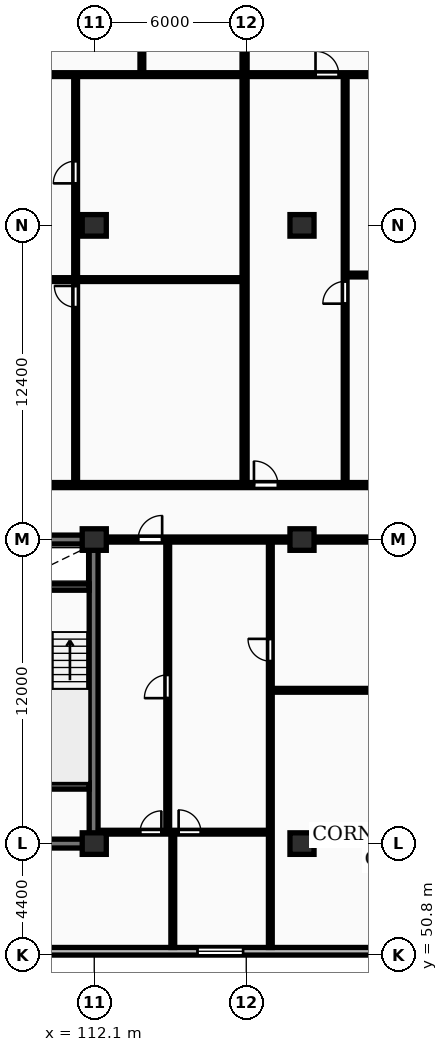
"""IFC4 building model, lengths in metres.
Left out: names, types, materials, properties, quantities, classifications, styles, units other than length and angle.
Written with IfcOpenShell. Run it as: python <this file> out.ifc"""

import sys

from ifc_helpers import new_model, si_unit, direction, frame, frame_2d, origin, origin_2d, place, context, subcontext, project, spatial, rectangle, extrude, element, fill, save


model = new_model("IFC4")
c1 = context("Model", 3, precision=1e-05, world=origin(), true_north=direction((0.0, 1.0)))
c2 = subcontext(c1, "Body", "Model", "MODEL_VIEW")
j1 = project(units=[si_unit("LENGTHUNIT", "METRE"), si_unit("PLANEANGLEUNIT", "RADIAN")], contexts=[c1])
p1 = place(None, origin())
s1 = spatial("IfcSite", under=j1, at=p1, CompositionType="ELEMENT")
p2 = place(p1, origin())
s2 = spatial("IfcBuilding", under=s1, at=p2, CompositionType="ELEMENT")
p3 = place(p2, frame((0.0, 0.0, 87.3)))
s3 = spatial("IfcBuildingStorey", under=s2, at=p3, CompositionType="ELEMENT", Elevation=87.3)
for number, where, z_axis, x_axis in (
    (1, (112.1, 55.2, 0.0), (0.0, 0.0, 1.0), (1.0, 0.0, 0.0)),
    (2, (112.1, 67.2, 0.0), (0.0, 0.0, 1.0), (1.0, 0.0, 0.0)),
    (3, (112.1, 79.6, 0.0), (0.0, 0.0, 1.0), (1.0, 0.0, 0.0)),
    (4, (120.3, 55.2, 0.0), (0.0, 0.0, 1.0), (1.0, 0.0, 0.0)),
    (5, (120.3, 67.2, 0.0), (0.0, 0.0, 1.0), (1.0, 0.0, 0.0)),
    (6, (120.3, 79.6, 0.0), (0.0, 0.0, 1.0), (1.0, 0.0, 0.0)),
):
    element("IfcColumn", number, at=place(p3, frame(where, z_axis=z_axis, x_axis=x_axis)), inside=s3, PredefinedType="COLUMN", context=c2, shape_type="SweptSolid", body=[
        extrude(rectangle(XDim=0.95, YDim=0.85, at=origin_2d()), origin(), (0.0, 0.0, 1.0), 3.25),
    ])
p4 = place(p3, frame((57.6, 50.95, 0.0), z_axis=(0.0, 0.0, 1.0), x_axis=(1.0, 0.0, 0.0)))
e7 = element("IfcWall", 7, at=p4, inside=s3, PredefinedType="STANDARD", context=c2, shape_type="SweptSolid", body=[
    extrude(rectangle(XDim=73.0, YDim=0.3, at=frame_2d((36.5, 0.0))), origin(), (0.0, 0.0, 1.0), 2.97),
])
p5 = place(p4, frame((15.225, 0.0, 0.85)))
e8 = element("IfcOpeningElement", 8, at=p5, cuts=e7, PredefinedType="OPENING", context=c2, shape_type="SweptSolid", body=[
    extrude(rectangle(XDim=1.8, YDim=1.8, at=frame_2d((0.9, 0.9))), frame((0.0, 0.16, 0.0), z_axis=(0.0, -1.0, 0.0), x_axis=(1.0, 0.0, 0.0)), (0.0, 0.0, 1.0), 0.32),
])
p6 = place(p4, frame((58.575, 0.0, 0.85)))
e9 = element("IfcOpeningElement", 9, at=p6, cuts=e7, PredefinedType="OPENING", context=c2, shape_type="SweptSolid", body=[
    extrude(rectangle(XDim=1.8, YDim=1.8, at=frame_2d((0.9, 0.9))), frame((0.0, 0.16, 0.0), z_axis=(0.0, -1.0, 0.0), x_axis=(1.0, 0.0, 0.0)), (0.0, 0.0, 1.0), 0.32),
])
p7 = place(p3, frame((75.95, 55.2, 0.0), z_axis=(0.0, 0.0, 1.0), x_axis=(1.0, 0.0, 0.0)))
e10 = element("IfcWall", 10, at=p7, inside=s3, PredefinedType="SHEAR", context=c2, shape_type="SweptSolid", body=[
    extrude(rectangle(XDim=36.3, YDim=0.35, at=frame_2d((18.15, 0.0))), origin(), (0.0, 0.0, 1.0), 3.25),
])
p8 = place(p3, frame((112.075, 55.375, 0.0), z_axis=(0.0, 0.0, 1.0), x_axis=(0.0, 1.0, 0.0)))
e11 = element("IfcWall", 11, at=p8, inside=s3, PredefinedType="SHEAR", context=c2, shape_type="SweptSolid", body=[
    extrude(rectangle(XDim=11.65, YDim=0.35, at=frame_2d((5.825, 0.0))), origin(), (0.0, 0.0, 1.0), 3.25),
])
p9 = place(p3, frame((75.95, 67.2, 0.0), z_axis=(0.0, 0.0, 1.0), x_axis=(1.0, 0.0, 0.0)))
e12 = element("IfcWall", 12, at=p9, inside=s3, PredefinedType="SHEAR", context=c2, shape_type="SweptSolid", body=[
    extrude(rectangle(XDim=36.3, YDim=0.35, at=frame_2d((18.15, 0.0))), origin(), (0.0, 0.0, 1.0), 3.25),
])
p10 = place(p9, frame((5.25, 0.0, 0.0)))
e13 = element("IfcOpeningElement", 13, at=p10, cuts=e12, PredefinedType="OPENING", context=c2, shape_type="SweptSolid", body=[
    extrude(rectangle(XDim=1.0, YDim=2.15, at=frame_2d((0.5, 1.075))), frame((0.0, 0.185, 0.0), z_axis=(0.0, -1.0, 0.0), x_axis=(1.0, 0.0, 0.0)), (0.0, 0.0, 1.0), 0.37),
])
p11 = place(p9, frame((21.6, 0.0, 0.0)))
e14 = element("IfcOpeningElement", 14, at=p11, cuts=e12, PredefinedType="OPENING", context=c2, shape_type="SweptSolid", body=[
    extrude(rectangle(XDim=1.5, YDim=2.2, at=frame_2d((0.75, 1.1))), frame((0.0, 0.185, 0.0), z_axis=(0.0, -1.0, 0.0), x_axis=(1.0, 0.0, 0.0)), (0.0, 0.0, 1.0), 0.37),
])
p12 = place(p9, frame((30.45, 0.0, 0.0)))
e15 = element("IfcOpeningElement", 15, at=p12, cuts=e12, PredefinedType="OPENING", context=c2, shape_type="SweptSolid", body=[
    extrude(rectangle(XDim=1.0, YDim=2.15, at=frame_2d((0.5, 1.075))), frame((0.0, 0.185, 0.0), z_axis=(0.0, -1.0, 0.0), x_axis=(1.0, 0.0, 0.0)), (0.0, 0.0, 1.0), 0.37),
])
for number, where, z_axis, x_axis in (
    (16, (108.66, 57.475, 0.0), (0.0, 0.0, 1.0), (1.0, 0.0, 0.0)),
    (17, (108.66, 65.325, 0.0), (0.0, 0.0, 1.0), (1.0, 0.0, 0.0)),
):
    element("IfcWall", number, at=place(p3, frame(where, z_axis=z_axis, x_axis=x_axis)), inside=s3, PredefinedType="SHEAR", context=c2, shape_type="SweptSolid", body=[
        extrude(rectangle(XDim=3.24, YDim=0.25, at=frame_2d((1.62, 0.0))), origin(), (0.0, 0.0, 1.0), 3.25),
    ])
p13 = place(p3, frame((119.05, 61.25, 0.0), z_axis=(0.0, 0.0, 1.0), x_axis=(1.0, 0.0, 0.0)))
e18 = element("IfcWall", 18, at=p13, inside=s3, PredefinedType="PARTITIONING", context=c2, shape_type="SweptSolid", body=[
    extrude(rectangle(XDim=11.55, YDim=0.15, at=frame_2d((5.775, 0.0))), origin(), (0.0, 0.0, 1.0), 2.97),
])
p14 = place(p13, frame((5.355, 0.0, 0.0)))
e19 = element("IfcOpeningElement", 19, at=p14, cuts=e18, PredefinedType="OPENING", context=c2, shape_type="SweptSolid", body=[
    extrude(rectangle(XDim=0.84, YDim=2.04, at=frame_2d((0.42, 1.02))), frame((0.0, 0.085, 0.0), z_axis=(0.0, -1.0, 0.0), x_axis=(1.0, 0.0, 0.0)), (0.0, 0.0, 1.0), 0.17),
])
p15 = place(p3, frame((119.05, 51.1, 0.0), z_axis=(0.0, 0.0, 1.0), x_axis=(0.0, 1.0, 0.0)))
e20 = element("IfcWall", 20, at=p15, inside=s3, PredefinedType="PARTITIONING", context=c2, shape_type="SweptSolid", body=[
    extrude(rectangle(XDim=16.05, YDim=0.15, at=frame_2d((8.025, 0.0))), origin(), (0.0, 0.0, 1.0), 2.97),
])
p16 = place(p15, frame((11.3, 0.0, 0.0)))
e21 = element("IfcOpeningElement", 21, at=p16, cuts=e20, PredefinedType="OPENING", context=c2, shape_type="SweptSolid", body=[
    extrude(rectangle(XDim=0.88, YDim=2.06, at=frame_2d((0.44, 1.03))), frame((0.0, 0.085, 0.0), z_axis=(0.0, -1.0, 0.0), x_axis=(1.0, 0.0, 0.0)), (0.0, 0.0, 1.0), 0.17),
])
p17 = place(p3, frame((115.0, 55.65, 0.0), z_axis=(0.0, 0.0, 1.0), x_axis=(0.0, 1.0, 0.0)))
e22 = element("IfcWall", 22, at=p17, inside=s3, PredefinedType="PARTITIONING", context=c2, shape_type="SweptSolid", body=[
    extrude(rectangle(XDim=11.5, YDim=0.15, at=frame_2d((5.75, 0.0))), origin(), (0.0, 0.0, 1.0), 2.97),
])
p18 = place(p17, frame((5.29, 0.0, 0.0)))
e23 = element("IfcOpeningElement", 23, at=p18, cuts=e22, PredefinedType="OPENING", context=c2, shape_type="SweptSolid", body=[
    extrude(rectangle(XDim=0.92, YDim=2.08, at=frame_2d((0.46, 1.04))), frame((0.0, 0.085, 0.0), z_axis=(0.0, -1.0, 0.0), x_axis=(1.0, 0.0, 0.0)), (0.0, 0.0, 1.0), 0.17),
])
p19 = place(p3, frame((115.2, 51.1, 0.0), z_axis=(0.0, 0.0, 1.0), x_axis=(0.0, 1.0, 0.0)))
e24 = element("IfcWall", 24, at=p19, inside=s3, PredefinedType="PARTITIONING", context=c2, shape_type="SweptSolid", body=[
    extrude(rectangle(XDim=4.55, YDim=0.15, at=frame_2d((2.275, 0.0))), origin(), (0.0, 0.0, 1.0), 2.97),
])
p20 = place(p3, frame((112.27, 55.65, 0.0), z_axis=(0.0, 0.0, 1.0), x_axis=(1.0, 0.0, 0.0)))
e25 = element("IfcWall", 25, at=p20, inside=s3, PredefinedType="PARTITIONING", context=c2, shape_type="SweptSolid", body=[
    extrude(rectangle(XDim=6.76, YDim=0.15, at=frame_2d((3.38, 0.0))), origin(), (0.0, 0.0, 1.0), 2.97),
])
p21 = place(p20, frame((1.64, 0.0, 0.0)))
e26 = element("IfcOpeningElement", 26, at=p21, cuts=e25, PredefinedType="OPENING", context=c2, shape_type="SweptSolid", body=[
    extrude(rectangle(XDim=0.84, YDim=2.04, at=frame_2d((0.42, 1.02))), frame((0.0, 0.085, 0.0), z_axis=(0.0, -1.0, 0.0), x_axis=(1.0, 0.0, 0.0)), (0.0, 0.0, 1.0), 0.17),
])
p22 = place(p20, frame((3.16, 0.0, 0.0)))
e27 = element("IfcOpeningElement", 27, at=p22, cuts=e25, PredefinedType="OPENING", context=c2, shape_type="SweptSolid", body=[
    extrude(rectangle(XDim=0.88, YDim=2.06, at=frame_2d((0.44, 1.03))), frame((0.0, 0.085, 0.0), z_axis=(0.0, -1.0, 0.0), x_axis=(1.0, 0.0, 0.0)), (0.0, 0.0, 1.0), 0.17),
])
p23 = place(p3, frame((112.25, 67.2, 0.0), z_axis=(0.0, 0.0, 1.0), x_axis=(1.0, 0.0, 0.0)))
e28 = element("IfcWall", 28, at=p23, inside=s3, PredefinedType="PARTITIONING", context=c2, shape_type="SweptSolid", body=[
    extrude(rectangle(XDim=18.35, YDim=0.2, at=frame_2d((9.175, 0.0))), origin(), (0.0, 0.0, 1.0), 2.433),
])
p24 = place(p23, frame((1.58, 0.0, 0.0)))
e29 = element("IfcOpeningElement", 29, at=p24, cuts=e28, PredefinedType="OPENING", context=c2, shape_type="SweptSolid", body=[
    extrude(rectangle(XDim=0.95, YDim=2.15, at=frame_2d((0.475, 1.075))), frame((0.0, 0.11, 0.0), z_axis=(0.0, -1.0, 0.0), x_axis=(1.0, 0.0, 0.0)), (0.0, 0.0, 1.0), 0.22),
])
p25 = place(p3, frame((118.033, 69.43, 0.0), z_axis=(0.0, 0.0, 1.0), x_axis=(0.0, 1.0, 0.0)))
e30 = element("IfcWall", 30, at=p25, inside=s3, PredefinedType="PARTITIONING", context=c2, shape_type="SweptSolid", body=[
    extrude(rectangle(XDim=26.47, YDim=0.2, at=frame_2d((13.235, 0.0))), origin(), (0.0, 0.0, 1.0), 2.97),
])
p26 = place(p3, frame((111.365, 69.41, 0.0), z_axis=(0.0, 0.0, 1.0), x_axis=(0.0, 1.0, 0.0)))
e31 = element("IfcWall", 31, at=p26, inside=s3, PredefinedType="PARTITIONING", context=c2, shape_type="SweptSolid", body=[
    extrude(rectangle(XDim=16.1, YDim=0.15, at=frame_2d((8.05, 0.0))), origin(), (0.0, 0.0, 1.0), 2.97),
])
p27 = place(p26, frame((6.96, 0.0, 0.0)))
e32 = element("IfcOpeningElement", 32, at=p27, cuts=e31, PredefinedType="OPENING", context=c2, shape_type="SweptSolid", body=[
    extrude(rectangle(XDim=0.84, YDim=2.04, at=frame_2d((0.42, 1.02))), frame((0.0, 0.085, 0.0), z_axis=(0.0, -1.0, 0.0), x_axis=(1.0, 0.0, 0.0)), (0.0, 0.0, 1.0), 0.17),
])
p28 = place(p26, frame((11.848, 0.0, 0.0)))
e33 = element("IfcOpeningElement", 33, at=p28, cuts=e31, PredefinedType="OPENING", context=c2, shape_type="SweptSolid", body=[
    extrude(rectangle(XDim=0.88, YDim=2.06, at=frame_2d((0.44, 1.03))), frame((0.0, 0.085, 0.0), z_axis=(0.0, -1.0, 0.0), x_axis=(1.0, 0.0, 0.0)), (0.0, 0.0, 1.0), 0.17),
])
p29 = place(p3, frame((105.017, 77.46, 0.0), z_axis=(0.0, 0.0, 1.0), x_axis=(1.0, 0.0, 0.0)))
e34 = element("IfcWall", 34, at=p29, inside=s3, PredefinedType="PARTITIONING", context=c2, shape_type="SweptSolid", body=[
    extrude(rectangle(XDim=12.936, YDim=0.15, at=frame_2d((6.468, 0.0))), origin(), (0.0, 0.0, 1.0), 2.97),
])
p30 = place(p29, frame((4.464, 0.0, 0.0)))
e35 = element("IfcOpeningElement", 35, at=p30, cuts=e34, PredefinedType="OPENING", context=c2, shape_type="SweptSolid", body=[
    extrude(rectangle(XDim=0.88, YDim=2.06, at=frame_2d((0.44, 1.03))), frame((0.0, 0.085, 0.0), z_axis=(0.0, -1.0, 0.0), x_axis=(1.0, 0.0, 0.0)), (0.0, 0.0, 1.0), 0.17),
])
p31 = place(p3, frame((113.98, 85.59, 0.0), z_axis=(0.0, 0.0, 1.0), x_axis=(0.0, 1.0, 0.0)))
e36 = element("IfcWall", 36, at=p31, inside=s3, PredefinedType="PARTITIONING", context=c2, shape_type="SweptSolid", body=[
    extrude(rectangle(XDim=2.58, YDim=0.15, at=frame_2d((1.29, 0.0))), origin(), (0.0, 0.0, 1.0), 2.97),
])
p32 = place(p3, frame((101.067, 85.55, 0.0), z_axis=(0.0, 0.0, 1.0), x_axis=(1.0, 0.0, 0.0)))
e37 = element("IfcWall", 37, at=p32, inside=s3, PredefinedType="PARTITIONING", context=c2, shape_type="SweptSolid", body=[
    extrude(rectangle(XDim=16.886, YDim=0.15, at=frame_2d((8.443, 0.0))), origin(), (0.0, 0.0, 1.0), 2.97),
])
p33 = place(p32, frame((2.72, 0.0, 0.0)))
e38 = element("IfcOpeningElement", 38, at=p33, cuts=e37, PredefinedType="OPENING", context=c2, shape_type="SweptSolid", body=[
    extrude(rectangle(XDim=0.92, YDim=2.08, at=frame_2d((0.46, 1.04))), frame((0.0, 0.085, 0.0), z_axis=(0.0, -1.0, 0.0), x_axis=(1.0, 0.0, 0.0)), (0.0, 0.0, 1.0), 0.17),
])
p34 = place(p3, frame((122.063, 77.64, 0.0), z_axis=(0.0, 0.0, 1.0), x_axis=(1.0, 0.0, 0.0)))
e39 = element("IfcWall", 39, at=p34, inside=s3, PredefinedType="PARTITIONING", context=c2, shape_type="SweptSolid", body=[
    extrude(rectangle(XDim=8.457, YDim=0.15, at=frame_2d((4.228, 0.0))), origin(), (0.0, 0.0, 1.0), 2.97),
])
p35 = place(p34, frame((3.171, 0.0, 0.0)))
e40 = element("IfcOpeningElement", 40, at=p35, cuts=e39, PredefinedType="OPENING", context=c2, shape_type="SweptSolid", body=[
    extrude(rectangle(XDim=0.88, YDim=2.06, at=frame_2d((0.44, 1.03))), frame((0.0, 0.085, 0.0), z_axis=(0.0, -1.0, 0.0), x_axis=(1.0, 0.0, 0.0)), (0.0, 0.0, 1.0), 0.17),
])
p36 = place(p3, frame((122.003, 69.41, 0.0), z_axis=(0.0, 0.0, 1.0), x_axis=(0.0, 1.0, 0.0)))
e41 = element("IfcWall", 41, at=p36, inside=s3, PredefinedType="PARTITIONING", context=c2, shape_type="SweptSolid", body=[
    extrude(rectangle(XDim=16.1, YDim=0.15, at=frame_2d((8.05, 0.0))), origin(), (0.0, 0.0, 1.0), 2.97),
])
p37 = place(p36, frame((7.1, 0.0, 0.0)))
e42 = element("IfcOpeningElement", 42, at=p37, cuts=e41, PredefinedType="OPENING", context=c2, shape_type="SweptSolid", body=[
    extrude(rectangle(XDim=0.88, YDim=2.06, at=frame_2d((0.44, 1.03))), frame((0.0, 0.085, 0.0), z_axis=(0.0, -1.0, 0.0), x_axis=(1.0, 0.0, 0.0)), (0.0, 0.0, 1.0), 0.17),
])
p38 = place(p3, frame((118.113, 85.55, 0.0), z_axis=(0.0, 0.0, 1.0), x_axis=(1.0, 0.0, 0.0)))
e43 = element("IfcWall", 43, at=p38, inside=s3, PredefinedType="PARTITIONING", context=c2, shape_type="SweptSolid", body=[
    extrude(rectangle(XDim=12.407, YDim=0.15, at=frame_2d((6.203, 0.0))), origin(), (0.0, 0.0, 1.0), 2.97),
])
p39 = place(p38, frame((2.72, 0.0, 0.0)))
e44 = element("IfcOpeningElement", 44, at=p39, cuts=e43, PredefinedType="OPENING", context=c2, shape_type="SweptSolid", body=[
    extrude(rectangle(XDim=0.92, YDim=2.08, at=frame_2d((0.46, 1.04))), frame((0.0, 0.085, 0.0), z_axis=(0.0, -1.0, 0.0), x_axis=(1.0, 0.0, 0.0)), (0.0, 0.0, 1.0), 0.17),
])
p40 = place(p3, frame((57.6, 69.35, 0.0), z_axis=(0.0, 0.0, 1.0), x_axis=(1.0, 0.0, 0.0)))
e45 = element("IfcWall", 45, at=p40, inside=s3, PredefinedType="PARTITIONING", context=c2, shape_type="SweptSolid", body=[
    extrude(rectangle(XDim=73.0, YDim=0.2, at=frame_2d((36.5, 0.0))), origin(), (0.0, 0.0, 1.0), 2.97),
])
p41 = place(p40, frame((0.37, 0.0, 0.0)))
e46 = element("IfcOpeningElement", 46, at=p41, cuts=e45, PredefinedType="OPENING", context=c2, shape_type="SweptSolid", body=[
    extrude(rectangle(XDim=0.95, YDim=2.15, at=frame_2d((0.475, 1.075))), frame((0.0, 0.11, 0.0), z_axis=(0.0, -1.0, 0.0), x_axis=(1.0, 0.0, 0.0)), (0.0, 0.0, 1.0), 0.22),
])
p42 = place(p40, frame((20.421, 0.0, 0.0)))
e47 = element("IfcOpeningElement", 47, at=p42, cuts=e45, PredefinedType="OPENING", context=c2, shape_type="SweptSolid", body=[
    extrude(rectangle(XDim=1.22, YDim=2.18, at=frame_2d((0.61, 1.09))), frame((0.0, 0.11, 0.0), z_axis=(0.0, -1.0, 0.0), x_axis=(1.0, 0.0, 0.0)), (0.0, 0.0, 1.0), 0.22),
])
p43 = place(p40, frame((32.729, 0.0, 0.0)))
e48 = element("IfcOpeningElement", 48, at=p43, cuts=e45, PredefinedType="OPENING", context=c2, shape_type="SweptSolid", body=[
    extrude(rectangle(XDim=0.95, YDim=2.15, at=frame_2d((0.475, 1.075))), frame((0.0, 0.11, 0.0), z_axis=(0.0, -1.0, 0.0), x_axis=(1.0, 0.0, 0.0)), (0.0, 0.0, 1.0), 0.22),
])
p44 = place(p40, frame((46.157, 0.0, 0.0)))
e49 = element("IfcOpeningElement", 49, at=p44, cuts=e45, PredefinedType="OPENING", context=c2, shape_type="SweptSolid", body=[
    extrude(rectangle(XDim=0.95, YDim=2.15, at=frame_2d((0.475, 1.075))), frame((0.0, 0.11, 0.0), z_axis=(0.0, -1.0, 0.0), x_axis=(1.0, 0.0, 0.0)), (0.0, 0.0, 1.0), 0.22),
])
p45 = place(p40, frame((60.803, 0.0, 0.0)))
e50 = element("IfcOpeningElement", 50, at=p45, cuts=e45, PredefinedType="OPENING", context=c2, shape_type="SweptSolid", body=[
    extrude(rectangle(XDim=0.95, YDim=2.15, at=frame_2d((0.475, 1.075))), frame((0.0, 0.11, 0.0), z_axis=(0.0, -1.0, 0.0), x_axis=(1.0, 0.0, 0.0)), (0.0, 0.0, 1.0), 0.22),
])
p46 = place(p6, origin())
e51 = element("IfcWindow", 51, at=p46, inside=s3, PartitioningType="SINGLE_PANEL", PredefinedType="WINDOW", context=c2, shape_type="SweptSolid", body=[
    extrude(rectangle(XDim=1.8, YDim=1.8, at=frame_2d((0.9, 0.9))), frame((0.0, 0.03, 0.0), z_axis=(0.0, -1.0, 0.0), x_axis=(1.0, 0.0, 0.0)), (0.0, 0.0, 1.0), 0.06),
])
fill(e9, e51)
p47 = place(p16, origin())
e52 = element("IfcDoor", 52, at=p47, inside=s3, OperationType="SINGLE_SWING_RIGHT", PredefinedType="DOOR", context=c2, shape_type="SweptSolid", body=[
    extrude(rectangle(XDim=0.88, YDim=2.06, at=frame_2d((0.44, 1.03))), frame((0.0, 0.025, 0.0), z_axis=(0.0, -1.0, 0.0), x_axis=(1.0, 0.0, 0.0)), (0.0, 0.0, 1.0), 0.05),
])
fill(e21, e52)
p48 = place(p18, origin())
e53 = element("IfcDoor", 53, at=p48, inside=s3, OperationType="SINGLE_SWING_LEFT", PredefinedType="DOOR", context=c2, shape_type="SweptSolid", body=[
    extrude(rectangle(XDim=0.92, YDim=2.08, at=frame_2d((0.46, 1.04))), frame((0.0, 0.025, 0.0), z_axis=(0.0, -1.0, 0.0), x_axis=(1.0, 0.0, 0.0)), (0.0, 0.0, 1.0), 0.05),
])
fill(e23, e53)
p49 = place(p21, origin())
e54 = element("IfcDoor", 54, at=p49, inside=s3, OperationType="SINGLE_SWING_RIGHT", PredefinedType="DOOR", context=c2, shape_type="SweptSolid", body=[
    extrude(rectangle(XDim=0.84, YDim=2.04, at=frame_2d((0.42, 1.02))), frame((0.0, 0.025, 0.0), z_axis=(0.0, -1.0, 0.0), x_axis=(1.0, 0.0, 0.0)), (0.0, 0.0, 1.0), 0.05),
])
fill(e26, e54)
p50 = place(p22, origin())
e55 = element("IfcDoor", 55, at=p50, inside=s3, OperationType="SINGLE_SWING_LEFT", PredefinedType="DOOR", context=c2, shape_type="SweptSolid", body=[
    extrude(rectangle(XDim=0.88, YDim=2.06, at=frame_2d((0.44, 1.03))), frame((0.0, 0.025, 0.0), z_axis=(0.0, -1.0, 0.0), x_axis=(1.0, 0.0, 0.0)), (0.0, 0.0, 1.0), 0.05),
])
fill(e27, e55)
p51 = place(p24, origin())
e56 = element("IfcDoor", 56, at=p51, inside=s3, OperationType="SINGLE_SWING_RIGHT", PredefinedType="DOOR", context=c2, shape_type="SweptSolid", body=[
    extrude(rectangle(XDim=0.95, YDim=2.15, at=frame_2d((0.475, 1.075))), frame((0.0, 0.025, 0.0), z_axis=(0.0, -1.0, 0.0), x_axis=(1.0, 0.0, 0.0)), (0.0, 0.0, 1.0), 0.05),
])
fill(e29, e56)
p52 = place(p27, origin())
e57 = element("IfcDoor", 57, at=p52, inside=s3, OperationType="SINGLE_SWING_RIGHT", PredefinedType="DOOR", context=c2, shape_type="SweptSolid", body=[
    extrude(rectangle(XDim=0.84, YDim=2.04, at=frame_2d((0.42, 1.02))), frame((0.0, 0.025, 0.0), z_axis=(0.0, -1.0, 0.0), x_axis=(1.0, 0.0, 0.0)), (0.0, 0.0, 1.0), 0.05),
])
fill(e32, e57)
p53 = place(p28, origin())
e58 = element("IfcDoor", 58, at=p53, inside=s3, OperationType="SINGLE_SWING_LEFT", PredefinedType="DOOR", context=c2, shape_type="SweptSolid", body=[
    extrude(rectangle(XDim=0.88, YDim=2.06, at=frame_2d((0.44, 1.03))), frame((0.0, 0.025, 0.0), z_axis=(0.0, -1.0, 0.0), x_axis=(1.0, 0.0, 0.0)), (0.0, 0.0, 1.0), 0.05),
])
fill(e33, e58)
p54 = place(p37, origin())
e59 = element("IfcDoor", 59, at=p54, inside=s3, OperationType="SINGLE_SWING_LEFT", PredefinedType="DOOR", context=c2, shape_type="SweptSolid", body=[
    extrude(rectangle(XDim=0.88, YDim=2.06, at=frame_2d((0.44, 1.03))), frame((0.0, 0.025, 0.0), z_axis=(0.0, -1.0, 0.0), x_axis=(1.0, 0.0, 0.0)), (0.0, 0.0, 1.0), 0.05),
])
fill(e42, e59)
p55 = place(p39, origin())
e60 = element("IfcDoor", 60, at=p55, inside=s3, OperationType="SINGLE_SWING_LEFT", PredefinedType="DOOR", context=c2, shape_type="SweptSolid", body=[
    extrude(rectangle(XDim=0.92, YDim=2.08, at=frame_2d((0.46, 1.04))), frame((0.0, 0.025, 0.0), z_axis=(0.0, -1.0, 0.0), x_axis=(1.0, 0.0, 0.0)), (0.0, 0.0, 1.0), 0.05),
])
fill(e44, e60)
p56 = place(p45, origin())
e61 = element("IfcDoor", 61, at=p56, inside=s3, OperationType="SINGLE_SWING_LEFT", PredefinedType="DOOR", context=c2, shape_type="SweptSolid", body=[
    extrude(rectangle(XDim=0.95, YDim=2.15, at=frame_2d((0.475, 1.075))), frame((0.0, 0.025, 0.0), z_axis=(0.0, -1.0, 0.0), x_axis=(1.0, 0.0, 0.0)), (0.0, 0.0, 1.0), 0.05),
])
fill(e50, e61)
save(model, sys.argv[1])
